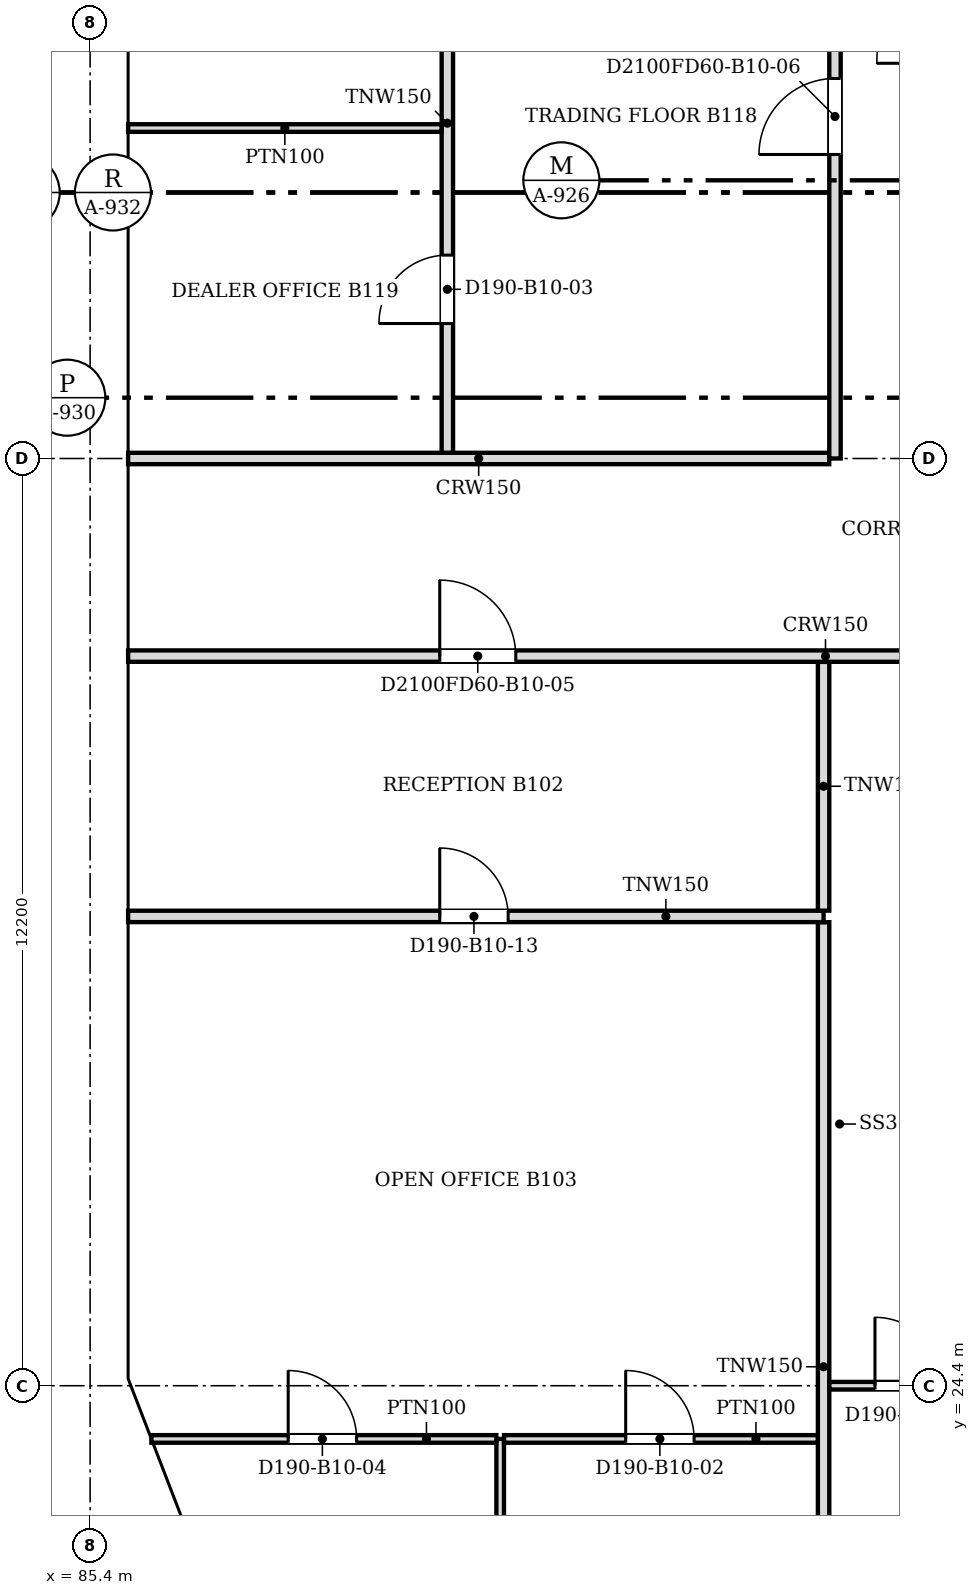
"""IFC4 building model, lengths in metres.
Left out: names, types, materials, properties, quantities, classifications, styles, units other than length and angle.
Written with IfcOpenShell. Run it as: python <this file> out.ifc"""

import sys

from ifc_helpers import new_model, si_unit, direction, frame, frame_2d, origin, place, context, subcontext, project, spatial, polyline, rectangle, outline, extrude, faceted_brep, source, transform, mapped, element, fill, save


model = new_model("IFC4")
c1 = context("Model", 3, precision=1e-05, world=origin(), true_north=direction((0.0, 1.0)))
c2 = subcontext(c1, "Body", "Model", "MODEL_VIEW")
j1 = project(units=[si_unit("LENGTHUNIT", "METRE"), si_unit("PLANEANGLEUNIT", "RADIAN")], contexts=[c1])
p1 = place(None, origin())
s1 = spatial("IfcSite", under=j1, at=p1, CompositionType="ELEMENT")
p2 = place(p1, origin())
s2 = spatial("IfcBuilding", under=s1, at=p2, CompositionType="ELEMENT")
p3 = place(p2, frame((0.0, 0.0, 95.2)))
s3 = spatial("IfcBuildingStorey", under=s2, at=p3, CompositionType="ELEMENT", Elevation=95.2)
m1 = source(origin(), c2, "Body", "Brep", [
    faceted_brep([(6.1, -0.25, 0.0), (3.05, -0.25, 3.8), (0.0, -0.25, 0.0), (6.1, -0.25, 0.0), (0.0, 0.25, 0.0), (3.05, 0.25, 3.8), (6.1, 0.25, 0.0), (6.1, 0.25, 0.0)], [[[0, 1, 2, 3]], [[4, 5, 6, 7]], [[6, 5, 1, 0]], [[5, 4, 2, 1]], [[4, 7, 3, 2]], [[3, 7, 6, 0]]]),
])
p4 = place(p3, frame((85.65, 42.7, 0.0), z_axis=(0.0, 0.0, 1.0), x_axis=(0.0, -1.0, 0.0)))
e1 = element("IfcWall", 1, at=p4, inside=s3, PredefinedType="SOLIDWALL", context=c2, shape_type="MappedRepresentation", body=[
    mapped(m1, transform((0.0, 0.0, 0.0), scale=1.0)),
])
m2 = source(origin(), c2, "Body", "SweptSolid", [
    extrude(outline(polyline([(5.579, 0.25), (3.05, 3.401), (0.521, 0.25), (5.579, 0.25)])), frame((0.0, 0.26, 0.0), z_axis=(0.0, -1.0, 0.0), x_axis=(1.0, 0.0, 0.0)), (0.0, 0.0, 1.0), 0.52),
])
p5 = place(p4, origin())
e2 = element("IfcOpeningElement", 2, at=p5, cuts=e1, PredefinedType="OPENING", context=c2, shape_type="MappedRepresentation", body=[
    mapped(m2, transform((0.0, 0.0, 0.0), scale=1.0)),
])
m3 = source(origin(), c2, "Body", "SweptSolid", [
    extrude(outline(polyline([(6.1, 0.0), (3.05, 3.8), (0.0, 0.0), (6.1, 0.0)])), frame((0.0, 0.25, 0.0), z_axis=(0.0, -1.0, 0.0), x_axis=(1.0, 0.0, 0.0)), (0.0, 0.0, 1.0), 0.5),
])
p6 = place(p3, frame((85.65, 36.6, 0.0), z_axis=(0.0, 0.0, 1.0), x_axis=(0.0, -1.0, 0.0)))
e3 = element("IfcWall", 3, at=p6, inside=s3, PredefinedType="SOLIDWALL", context=c2, shape_type="MappedRepresentation", body=[
    mapped(m3, transform((0.0, 0.0, 0.0), scale=1.0)),
])
p7 = place(p6, origin())
e4 = element("IfcOpeningElement", 4, at=p7, cuts=e3, PredefinedType="OPENING", context=c2, shape_type="MappedRepresentation", body=[
    mapped(m2, transform((0.0, 0.0, 0.0), scale=1.0)),
])
m4 = source(origin(), c2, "Body", "Brep", [
    faceted_brep([(6.053, -0.25, 0.0), (3.05, -0.25, 3.8), (0.0, -0.25, 0.0), (0.0, 0.25, 0.0), (3.05, 0.25, 3.8), (6.007, 0.25, 0.059), (6.007, 0.25, 0.0), (6.053, 0.0, 0.0)], [[[0, 1, 2]], [[3, 4, 5, 6]], [[5, 4, 1, 0, 7]], [[4, 3, 2, 1]], [[3, 6, 7, 0, 2]], [[7, 6, 5]]]),
])
p8 = place(p3, frame((85.65, 30.5, 0.0), z_axis=(0.0, 0.0, 1.0), x_axis=(0.0, -1.0, 0.0)))
e5 = element("IfcWall", 5, at=p8, inside=s3, PredefinedType="SOLIDWALL", context=c2, shape_type="MappedRepresentation", body=[
    mapped(m4, transform((0.0, 0.0, 0.0), scale=1.0)),
])
m5 = source(origin(), c2, "Body", "SweptSolid", [
    extrude(outline(polyline([(5.537, 0.25), (3.049, 3.399), (0.521, 0.25), (5.537, 0.25)])), frame((0.0, 0.26, 0.0), z_axis=(0.0, -1.0, 0.0), x_axis=(1.0, 0.0, 0.0)), (0.0, 0.0, 1.0), 0.52),
])
p9 = place(p8, origin())
e6 = element("IfcOpeningElement", 6, at=p9, cuts=e5, PredefinedType="OPENING", context=c2, shape_type="MappedRepresentation", body=[
    mapped(m5, transform((0.0, 0.0, 0.0), scale=1.0)),
])
m6 = source(origin(), c2, "Body", "Brep", [
    faceted_brep([(3.003, -0.25, 3.732), (2.95, -0.25, 3.8), (0.0, -0.25, 0.0), (3.003, -0.25, 0.0), (0.047, 0.25, 0.06), (2.898, 0.25, 3.732), (2.898, 0.25, 0.0), (0.047, 0.25, 0.0), (2.95, 0.0, 3.8), (0.0, 0.0, 0.0)], [[[0, 1, 2, 3]], [[4, 5, 6, 7]], [[8, 1, 0]], [[5, 4, 9, 2, 1, 8]], [[7, 6, 3, 2, 9]], [[7, 9, 4]], [[3, 6, 5, 8, 0]]]),
])
p10 = place(p3, frame((85.65, 24.447, 0.0), z_axis=(0.0, 0.0, 1.0), x_axis=(0.35992665181, -0.932980602862, 0.0)))
e7 = element("IfcWall", 7, at=p10, inside=s3, PredefinedType="SOLIDWALL", context=c2, shape_type="MappedRepresentation", body=[
    mapped(m6, transform((0.0, 0.0, 0.0), scale=1.0)),
])
m7 = source(origin(), c2, "Body", "SweptSolid", [
    extrude(outline(polyline([(2.75, 3.135), (0.511, 0.25), (2.75, 0.25), (2.75, 3.135)])), frame((0.0, 0.26, 0.0), z_axis=(0.0, -1.0, 0.0), x_axis=(1.0, 0.0, 0.0)), (0.0, 0.0, 1.0), 0.52),
])
p11 = place(p10, origin())
e8 = element("IfcOpeningElement", 8, at=p11, cuts=e7, PredefinedType="OPENING", context=c2, shape_type="MappedRepresentation", body=[
    mapped(m7, transform((0.0, 0.0, 0.0), scale=1.0)),
])
p12 = place(p2, frame((0.0, 0.0, 99.0)))
s4 = spatial("IfcBuildingStorey", under=s2, at=p12, CompositionType="ELEMENT", Elevation=99.0)
m8 = source(origin(), c2, "Body", "SweptSolid", [
    extrude(outline(polyline([(3.05, 0.0), (6.1, 3.8), (3.05, 7.6), (0.0, 3.8), (3.05, 0.0)])), frame((0.0, 0.25, 0.0), z_axis=(0.0, -1.0, 0.0), x_axis=(1.0, 0.0, 0.0)), (0.0, 0.0, 1.0), 0.5),
])
p13 = place(p12, frame((85.65, 45.75, -3.8), z_axis=(0.0, 0.0, 1.0), x_axis=(0.0, -1.0, 0.0)))
e9 = element("IfcWall", 9, at=p13, inside=s4, PredefinedType="SOLIDWALL", context=c2, shape_type="MappedRepresentation", body=[
    mapped(m8, transform((0.0, 0.0, 0.0), scale=1.0)),
])
m9 = source(origin(), c2, "Body", "SweptSolid", [
    extrude(outline(polyline([(3.05, 0.399), (5.78, 3.8), (3.05, 7.201), (0.321, 3.8), (3.05, 0.399)])), frame((0.0, 0.26, 0.0), z_axis=(0.0, -1.0, 0.0), x_axis=(1.0, 0.0, 0.0)), (0.0, 0.0, 1.0), 0.52),
])
p14 = place(p13, origin())
e10 = element("IfcOpeningElement", 10, at=p14, cuts=e9, PredefinedType="OPENING", context=c2, shape_type="MappedRepresentation", body=[
    mapped(m9, transform((0.0, 0.0, 0.0), scale=1.0)),
])
m10 = source(origin(), c2, "Body", "Brep", [
    faceted_brep([(3.05, -0.25, 0.0), (6.1, -0.25, 3.8), (6.1, -0.25, 3.8), (3.05, -0.25, 7.6), (0.0, -0.25, 3.8), (0.0, 0.25, 3.8), (3.05, 0.25, 7.6), (6.1, 0.25, 3.8), (6.1, 0.25, 3.8), (3.05, 0.25, 0.0)], [[[0, 1, 2, 3, 4]], [[5, 6, 7, 8, 9]], [[9, 8, 1, 0]], [[7, 6, 3, 2]], [[6, 5, 4, 3]], [[5, 9, 0, 4]], [[1, 8, 7, 2]]]),
])
p15 = place(p12, frame((85.65, 39.65, -3.8), z_axis=(0.0, 0.0, 1.0), x_axis=(0.0, -1.0, 0.0)))
e11 = element("IfcWall", 11, at=p15, inside=s4, PredefinedType="SOLIDWALL", context=c2, shape_type="MappedRepresentation", body=[
    mapped(m10, transform((0.0, 0.0, 0.0), scale=1.0)),
])
p16 = place(p15, origin())
e12 = element("IfcOpeningElement", 12, at=p16, cuts=e11, PredefinedType="OPENING", context=c2, shape_type="MappedRepresentation", body=[
    mapped(m9, transform((0.0, 0.0, 0.0), scale=1.0)),
])
p17 = place(p12, frame((85.65, 33.55, -3.8), z_axis=(0.0, 0.0, 1.0), x_axis=(0.0, -1.0, 0.0)))
e13 = element("IfcWall", 13, at=p17, inside=s4, PredefinedType="SOLIDWALL", context=c2, shape_type="MappedRepresentation", body=[
    mapped(m8, transform((0.0, 0.0, 0.0), scale=1.0)),
])
p18 = place(p17, origin())
e14 = element("IfcOpeningElement", 14, at=p18, cuts=e13, PredefinedType="OPENING", context=c2, shape_type="MappedRepresentation", body=[
    mapped(m9, transform((0.0, 0.0, 0.0), scale=1.0)),
])
m11 = source(origin(), c2, "Body", "Brep", [
    faceted_brep([(3.003, -0.25, 0.0), (3.05, -0.25, 0.06), (3.05, -0.25, 7.54), (3.003, -0.25, 7.6), (0.0, -0.25, 3.8), (0.0, 0.25, 3.8), (2.957, 0.25, 7.541), (2.957, 0.25, 0.059), (3.003, 0.0, 0.0), (3.003, 0.0, 7.6)], [[[0, 1, 2, 3, 4]], [[5, 6, 7]], [[1, 0, 8]], [[9, 3, 2]], [[6, 5, 4, 3, 9]], [[5, 7, 8, 0, 4]], [[1, 8, 7, 6, 9, 2]]]),
])
p19 = place(p12, frame((85.65, 27.45, -3.8), z_axis=(0.0, 0.0, 1.0), x_axis=(0.0, -1.0, 0.0)))
e15 = element("IfcWall", 15, at=p19, inside=s4, PredefinedType="SOLIDWALL", context=c2, shape_type="MappedRepresentation", body=[
    mapped(m11, transform((0.0, 0.0, 0.0), scale=1.0)),
])
m12 = source(origin(), c2, "Body", "SweptSolid", [
    extrude(outline(polyline([(2.803, 6.944), (0.319, 3.8), (2.803, 0.656), (2.803, 6.944)])), frame((0.0, 0.26, 0.0), z_axis=(0.0, -1.0, 0.0), x_axis=(1.0, 0.0, 0.0)), (0.0, 0.0, 1.0), 0.52),
])
p20 = place(p19, origin())
e16 = element("IfcOpeningElement", 16, at=p20, cuts=e15, PredefinedType="OPENING", context=c2, shape_type="MappedRepresentation", body=[
    mapped(m12, transform((0.0, 0.0, 0.0), scale=1.0)),
])
m13 = source(origin(), c2, "Body", "Brep", [
    faceted_brep([(0.047, -0.25, 0.0), (2.997, -0.25, 3.8), (0.047, -0.25, 7.6), (0.0, -0.25, 7.541), (0.0, -0.25, 0.059), (0.093, 0.25, 7.54), (2.944, 0.25, 3.868), (2.944, 0.25, 3.732), (0.093, 0.25, 0.06), (2.997, 0.0, 3.8), (0.047, 0.0, 0.0), (0.047, 0.0, 7.6)], [[[0, 1, 2, 3, 4]], [[5, 6, 7, 8]], [[8, 7, 9, 1, 0, 10]], [[6, 5, 11, 2, 1, 9]], [[3, 2, 11]], [[10, 0, 4]], [[8, 10, 4, 3, 11, 5]], [[9, 7, 6]]]),
])
p21 = place(p12, frame((85.633, 24.49, -3.8), z_axis=(0.0, 0.0, 1.0), x_axis=(0.359901446078, -0.932990326376, 0.0)))
e17 = element("IfcWall", 17, at=p21, inside=s4, PredefinedType="SOLIDWALL", context=c2, shape_type="MappedRepresentation", body=[
    mapped(m13, transform((0.0, 0.0, 0.0), scale=1.0)),
])
m14 = source(origin(), c2, "Body", "SweptSolid", [
    extrude(outline(polyline([(0.247, 0.665), (2.681, 3.8), (0.247, 6.935), (0.247, 0.665)])), frame((0.0, 0.26, 0.0), z_axis=(0.0, -1.0, 0.0), x_axis=(1.0, 0.0, 0.0)), (0.0, 0.0, 1.0), 0.52),
])
p22 = place(p21, origin())
e18 = element("IfcOpeningElement", 18, at=p22, cuts=e17, PredefinedType="OPENING", context=c2, shape_type="MappedRepresentation", body=[
    mapped(m14, transform((0.0, 0.0, 0.0), scale=1.0)),
])
p23 = place(p3, frame((95.05, 18.8, 0.0), z_axis=(0.0, 0.0, 1.0), x_axis=(0.0, 1.0, 0.0)))
e19 = element("IfcWall", 19, at=p23, inside=s3, PredefinedType="PARTITIONING", context=c2, shape_type="SweptSolid", body=[
    extrude(rectangle(XDim=11.699, YDim=0.15, at=frame_2d((5.85, 0.0))), origin(), (0.0, 0.0, 1.0), 3.067),
])
p24 = place(p3, frame((90.795, 19.108, 0.0), z_axis=(0.0, 0.0, 1.0), x_axis=(0.0, 1.0, 0.0)))
e20 = element("IfcWall", 20, at=p24, inside=s3, PredefinedType="PARTITIONING", context=c2, shape_type="SweptSolid", body=[
    extrude(rectangle(XDim=4.592, YDim=0.1, at=frame_2d((2.296, 0.0))), origin(), (0.0, 0.0, 1.0), 3.067),
])
p25 = place(p3, frame((90.744, 23.7, 0.0), z_axis=(0.0, 0.0, 1.0), x_axis=(-1.0, 0.0, 0.0)))
e21 = element("IfcWall", 21, at=p25, inside=s3, PredefinedType="PARTITIONING", context=c2, shape_type="SweptSolid", body=[
    extrude(rectangle(XDim=4.538, YDim=0.1, at=frame_2d((2.269, 0.0))), origin(), (0.0, 0.0, 1.0), 3.067),
])
m15 = source(origin(), c2, "Body", "SweptSolid", [
    extrude(rectangle(XDim=0.9, YDim=2.1, at=frame_2d((0.45, 1.05))), frame((0.0, 0.06, 0.0), z_axis=(0.0, -1.0, 0.0), x_axis=(1.0, 0.0, 0.0)), (0.0, 0.0, 1.0), 0.12),
])
p26 = place(p25, frame((1.838, 0.0, 0.0)))
e22 = element("IfcOpeningElement", 22, at=p26, cuts=e21, PredefinedType="OPENING", context=c2, shape_type="MappedRepresentation", body=[
    mapped(m15, transform((0.0, 0.0, 0.0), scale=1.0)),
])
p27 = place(p3, frame((94.974, 23.7, 0.0), z_axis=(0.0, 0.0, 1.0), x_axis=(-1.0, 0.0, 0.0)))
e23 = element("IfcWall", 23, at=p27, inside=s3, PredefinedType="PARTITIONING", context=c2, shape_type="SweptSolid", body=[
    extrude(rectangle(XDim=4.128, YDim=0.1, at=frame_2d((2.064, 0.0))), origin(), (0.0, 0.0, 1.0), 3.067),
])
p28 = place(p27, frame((1.628, 0.0, 0.0)))
e24 = element("IfcOpeningElement", 24, at=p28, cuts=e23, PredefinedType="OPENING", context=c2, shape_type="MappedRepresentation", body=[
    mapped(m15, transform((0.0, 0.0, 0.0), scale=1.0)),
])
p29 = place(p3, frame((97.249, 24.4, 0.0), z_axis=(0.0, 0.0, 1.0), x_axis=(-1.0, 0.0, 0.0)))
e25 = element("IfcWall", 25, at=p29, inside=s3, PredefinedType="PARTITIONING", context=c2, shape_type="SweptSolid", body=[
    extrude(rectangle(XDim=2.123, YDim=0.1, at=frame_2d((1.062, 0.0))), origin(), (0.0, 0.0, 1.0), 3.067),
])
p30 = place(p29, frame((0.623, 0.0, 0.0)))
e26 = element("IfcOpeningElement", 26, at=p30, cuts=e25, PredefinedType="OPENING", context=c2, shape_type="MappedRepresentation", body=[
    mapped(m15, transform((0.0, 0.0, 0.0), scale=1.0)),
])
p31 = place(p3, frame((95.05, 30.575, 0.0), z_axis=(0.0, 0.0, 1.0), x_axis=(-1.0, 0.0, 0.0)))
e27 = element("IfcWall", 27, at=p31, inside=s3, PredefinedType="PARTITIONING", context=c2, shape_type="SweptSolid", body=[
    extrude(rectangle(XDim=9.15, YDim=0.15, at=frame_2d((4.575, 0.0))), origin(), (0.0, 0.0, 1.0), 3.067),
])
m16 = source(origin(), c2, "Body", "SweptSolid", [
    extrude(rectangle(XDim=0.9, YDim=2.1, at=frame_2d((0.45, 1.05))), frame((0.0, 0.085, 0.0), z_axis=(0.0, -1.0, 0.0), x_axis=(1.0, 0.0, 0.0)), (0.0, 0.0, 1.0), 0.17),
])
p32 = place(p31, frame((4.15, 0.0, 0.0)))
e28 = element("IfcOpeningElement", 28, at=p32, cuts=e27, PredefinedType="OPENING", context=c2, shape_type="MappedRepresentation", body=[
    mapped(m16, transform((0.0, 0.0, 0.0), scale=1.0)),
])
p33 = place(p3, frame((95.05, 30.651, 0.0), z_axis=(0.0, 0.0, 1.0), x_axis=(0.0, 1.0, 0.0)))
e29 = element("IfcWall", 29, at=p33, inside=s3, PredefinedType="PARTITIONING", context=c2, shape_type="SweptSolid", body=[
    extrude(rectangle(XDim=3.273, YDim=0.15, at=frame_2d((1.637, 0.0))), origin(), (0.0, 0.0, 1.0), 3.067),
])
p34 = place(p3, frame((121.5, 34.0, 0.0), z_axis=(0.0, 0.0, 1.0), x_axis=(-1.0, 0.0, 0.0)))
e30 = element("IfcWall", 30, at=p34, inside=s3, PredefinedType="PARTITIONING", context=c2, shape_type="SweptSolid", body=[
    extrude(rectangle(XDim=35.6, YDim=0.15, at=frame_2d((17.8, 0.0))), origin(), (0.0, 0.0, 1.0), 3.067),
])
m17 = source(origin(), c2, "Body", "SweptSolid", [
    extrude(rectangle(XDim=1.0, YDim=2.1, at=frame_2d((0.5, 1.05))), frame((0.0, 0.085, 0.0), z_axis=(0.0, -1.0, 0.0), x_axis=(1.0, 0.0, 0.0)), (0.0, 0.0, 1.0), 0.17),
])
p35 = place(p34, frame((2.099, 0.0, 0.0)))
e31 = element("IfcOpeningElement", 31, at=p35, cuts=e30, PredefinedType="OPENING", context=c2, shape_type="MappedRepresentation", body=[
    mapped(m17, transform((0.0, 0.0, 0.0), scale=1.0)),
])
p36 = place(p34, frame((13.999, 0.0, 0.0)))
e32 = element("IfcOpeningElement", 32, at=p36, cuts=e30, PredefinedType="OPENING", context=c2, shape_type="MappedRepresentation", body=[
    mapped(m17, transform((0.0, 0.0, 0.0), scale=1.0)),
])
p37 = place(p34, frame((7.9, 0.0, 0.0)))
e33 = element("IfcOpeningElement", 33, at=p37, cuts=e30, PredefinedType="OPENING", context=c2, shape_type="MappedRepresentation", body=[
    mapped(m17, transform((0.0, 0.0, 0.0), scale=1.0)),
])
p38 = place(p34, frame((30.5, 0.0, 0.0)))
e34 = element("IfcOpeningElement", 34, at=p38, cuts=e30, PredefinedType="OPENING", context=c2, shape_type="MappedRepresentation", body=[
    mapped(m17, transform((0.0, 0.0, 0.0), scale=1.0)),
])
p39 = place(p34, frame((21.45, 0.0, 0.0)))
e35 = element("IfcOpeningElement", 35, at=p39, cuts=e30, PredefinedType="OPENING", context=c2, shape_type="MappedRepresentation", body=[
    mapped(m16, transform((0.0, 0.0, 0.0), scale=1.0)),
])
p40 = place(p3, frame((85.9, 36.6, 0.0), z_axis=(0.0, 0.0, 1.0), x_axis=(1.0, 0.0, 0.0)))
e36 = element("IfcWall", 36, at=p40, inside=s3, PredefinedType="PARTITIONING", context=c2, shape_type="SweptSolid", body=[
    extrude(rectangle(XDim=9.224, YDim=0.15, at=frame_2d((4.612, 0.0))), origin(), (0.0, 0.0, 1.0), 3.067),
])
p41 = place(p3, frame((95.2, 36.6, 0.0), z_axis=(0.0, 0.0, 1.0), x_axis=(0.0, 1.0, 0.0)))
e37 = element("IfcWall", 37, at=p41, inside=s3, PredefinedType="PARTITIONING", context=c2, shape_type="SweptSolid", body=[
    extrude(rectangle(XDim=14.6, YDim=0.15, at=frame_2d((7.3, 0.0))), origin(), (0.0, 0.0, 1.0), 3.067),
])
p42 = place(p41, frame((11.301, 0.0, 0.0)))
e38 = element("IfcOpeningElement", 38, at=p42, cuts=e37, PredefinedType="OPENING", context=c2, shape_type="MappedRepresentation", body=[
    mapped(m17, transform((0.0, 0.0, 0.0), scale=1.0)),
])
p43 = place(p41, frame((4.0, 0.0, 0.0)))
e39 = element("IfcOpeningElement", 39, at=p43, cuts=e37, PredefinedType="OPENING", context=c2, shape_type="MappedRepresentation", body=[
    mapped(m17, transform((0.0, 0.0, 0.0), scale=1.0)),
])
p44 = place(p3, frame((90.1, 36.676, 0.0), z_axis=(0.0, 0.0, 1.0), x_axis=(0.0, 1.0, 0.0)))
e40 = element("IfcWall", 40, at=p44, inside=s3, PredefinedType="PARTITIONING", context=c2, shape_type="SweptSolid", body=[
    extrude(rectangle(XDim=8.848, YDim=0.15, at=frame_2d((4.424, 0.0))), origin(), (0.0, 0.0, 1.0), 3.067),
])
p45 = place(p44, frame((1.7, 0.0, 0.0)))
e41 = element("IfcOpeningElement", 41, at=p45, cuts=e40, PredefinedType="OPENING", context=c2, shape_type="MappedRepresentation", body=[
    mapped(m16, transform((0.0, 0.0, 0.0), scale=1.0)),
])
p46 = place(p44, frame((6.072, 0.0, 0.0)))
e42 = element("IfcOpeningElement", 42, at=p46, cuts=e40, PredefinedType="OPENING", context=c2, shape_type="MappedRepresentation", body=[
    mapped(m16, transform((0.0, 0.0, 0.0), scale=1.0)),
])
p47 = place(p3, frame((85.9, 40.948, 0.0), z_axis=(0.0, 0.0, 1.0), x_axis=(1.0, 0.0, 0.0)))
e43 = element("IfcWall", 43, at=p47, inside=s3, PredefinedType="PARTITIONING", context=c2, shape_type="SweptSolid", body=[
    extrude(rectangle(XDim=4.124, YDim=0.1, at=frame_2d((2.062, 0.0))), origin(), (0.0, 0.0, 1.0), 3.067),
])
m18 = source(origin(), c2, "Body", "SweptSolid", [
    extrude(rectangle(XDim=0.9, YDim=2.1, at=frame_2d((0.45, 1.05))), frame((0.0, 0.025, 0.0), z_axis=(0.0, -1.0, 0.0), x_axis=(1.0, 0.0, 0.0)), (0.0, 0.0, 1.0), 0.05),
])
p48 = place(p30, origin())
e44 = element("IfcDoor", 44, at=p48, inside=s3, OperationType="SINGLE_SWING_RIGHT", PredefinedType="DOOR", context=c2, shape_type="MappedRepresentation", body=[
    mapped(m18, transform((0.0, 0.0, 0.0), scale=1.0)),
])
fill(e26, e44)
p49 = place(p28, origin())
e45 = element("IfcDoor", 45, at=p49, inside=s3, OperationType="SINGLE_SWING_RIGHT", PredefinedType="DOOR", context=c2, shape_type="MappedRepresentation", body=[
    mapped(m18, transform((0.0, 0.0, 0.0), scale=1.0)),
])
fill(e24, e45)
p50 = place(p45, origin())
e46 = element("IfcDoor", 46, at=p50, inside=s3, OperationType="SINGLE_SWING_LEFT", PredefinedType="DOOR", context=c2, shape_type="MappedRepresentation", body=[
    mapped(m18, transform((0.0, 0.0, 0.0), scale=1.0)),
])
fill(e41, e46)
p51 = place(p26, origin())
e47 = element("IfcDoor", 47, at=p51, inside=s3, OperationType="SINGLE_SWING_RIGHT", PredefinedType="DOOR", context=c2, shape_type="MappedRepresentation", body=[
    mapped(m18, transform((0.0, 0.0, 0.0), scale=1.0)),
])
fill(e22, e47)
m19 = source(origin(), c2, "Body", "SweptSolid", [
    extrude(rectangle(XDim=1.0, YDim=2.1, at=frame_2d((0.5, 1.05))), frame((0.0, 0.025, 0.0), z_axis=(0.0, -1.0, 0.0), x_axis=(1.0, 0.0, 0.0)), (0.0, 0.0, 1.0), 0.05),
])
p52 = place(p38, origin())
e48 = element("IfcDoor", 48, at=p52, inside=s3, OperationType="SINGLE_SWING_RIGHT", PredefinedType="DOOR", context=c2, shape_type="MappedRepresentation", body=[
    mapped(m19, transform((0.0, 0.0, 0.0), scale=1.0)),
])
fill(e34, e48)
p53 = place(p32, origin())
e49 = element("IfcDoor", 49, at=p53, inside=s3, OperationType="SINGLE_SWING_RIGHT", PredefinedType="DOOR", context=c2, shape_type="MappedRepresentation", body=[
    mapped(m18, transform((0.0, 0.0, 0.0), scale=1.0)),
])
fill(e28, e49)
p54 = place(p43, origin())
e50 = element("IfcDoor", 50, at=p54, inside=s3, OperationType="SINGLE_SWING_LEFT", PredefinedType="DOOR", context=c2, shape_type="MappedRepresentation", body=[
    mapped(m19, transform((0.0, 0.0, 0.0), scale=1.0)),
])
fill(e39, e50)
save(model, sys.argv[1])
